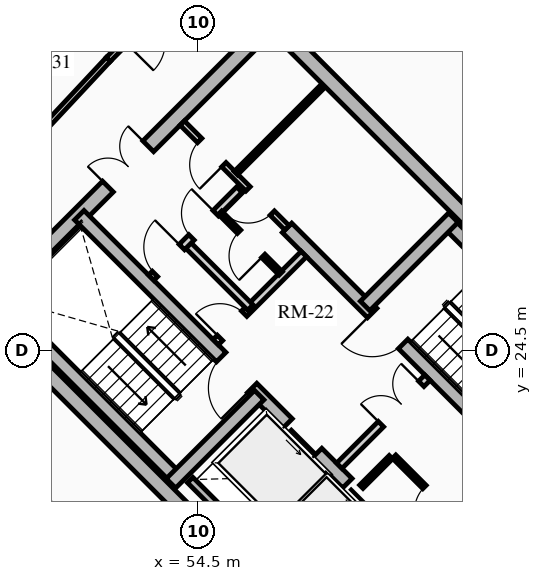
"""IFC4 building model, lengths in metres.
Left out: names, types, materials, properties, quantities, classifications, styles, units other than length and angle.
Written with IfcOpenShell. Run it as: python <this file> out.ifc"""

import sys

from ifc_helpers import new_model, si_unit, direction, frame, frame_2d, origin, place, context, subcontext, project, spatial, rectangle, extrude, source, transform, mapped, element, fill, save


model = new_model("IFC4")
c1 = context("Model", 3, precision=1e-05, world=origin(), true_north=direction((0.0, 1.0)))
c2 = subcontext(c1, "Body", "Model", "MODEL_VIEW")
j1 = project(units=[si_unit("LENGTHUNIT", "METRE"), si_unit("PLANEANGLEUNIT", "RADIAN")], contexts=[c1])
p1 = place(None, origin())
s1 = spatial("IfcSite", under=j1, at=p1, CompositionType="ELEMENT")
p2 = place(p1, origin())
s2 = spatial("IfcBuilding", under=s1, at=p2, CompositionType="ELEMENT")
p3 = place(p2, frame((0.0, 0.0, 163.24)))
s3 = spatial("IfcBuildingStorey", under=s2, at=p3, CompositionType="ELEMENT", Elevation=163.24)
for number, where, z_axis, x_axis in (
    (1, (58.702, 15.732, 0.0), (0.0, 0.0, 1.0), (-0.707, 0.707, 0.0)),
    (2, (66.268, 23.298, 0.0), (0.0, 0.0, 1.0), (-0.707, 0.707, 0.0)),
):
    element("IfcWall", number, at=place(p3, frame(where, z_axis=z_axis, x_axis=x_axis)), inside=s3, PredefinedType="SHEAR", context=c2, shape_type="SweptSolid", body=[
        extrude(rectangle(XDim=14.1, YDim=0.4, at=frame_2d((7.05, 0.0))), origin(), (0.0, 0.0, 1.0), 2.91),
    ])
p4 = place(p3, frame((58.561, 15.873, 0.0), z_axis=(0.0, 0.0, 1.0), x_axis=(0.707106781187, 0.707106781187, 0.0)))
e3 = element("IfcWall", 3, at=p4, inside=s3, PredefinedType="SHEAR", context=c2, shape_type="SweptSolid", body=[
    extrude(rectangle(XDim=10.7, YDim=0.4, at=frame_2d((5.35, 0.0))), origin(), (0.0, 0.0, 1.0), 2.91),
])
m1 = source(origin(), c2, "Body", "SweptSolid", [
    extrude(rectangle(XDim=1.5, YDim=2.02, at=frame_2d((0.75, 1.01))), frame((0.0, 0.21, 0.0), z_axis=(0.0, -1.0, 0.0), x_axis=(1.0, 0.0, 0.0)), (0.0, 0.0, 1.0), 0.42),
])
p5 = place(p4, frame((5.45, 0.0, 0.0)))
e4 = element("IfcOpeningElement", 4, at=p5, cuts=e3, PredefinedType="OPENING", context=c2, shape_type="MappedRepresentation", body=[
    mapped(m1, transform((0.0, 0.0, 0.0), x_axis=(1.0, 0.0, 0.0), y_axis=(0.0, 1.0, 0.0), z_axis=(0.0, 0.0, 1.0), scale=1.0)),
])
p6 = place(p3, frame((48.873, 25.561, 0.0), z_axis=(0.0, 0.0, 1.0), x_axis=(0.707106781187, 0.707106781187, 0.0)))
e5 = element("IfcWall", 5, at=p6, inside=s3, PredefinedType="SHEAR", context=c2, shape_type="SweptSolid", body=[
    extrude(rectangle(XDim=10.7, YDim=0.4, at=frame_2d((5.35, 0.0))), origin(), (0.0, 0.0, 1.0), 2.91),
])
p7 = place(p6, frame((4.6, 0.0, 0.0)))
e6 = element("IfcOpeningElement", 6, at=p7, cuts=e5, PredefinedType="OPENING", context=c2, shape_type="MappedRepresentation", body=[
    mapped(m1, transform((0.0, 0.0, 0.0), x_axis=(1.0, 0.0, 0.0), y_axis=(0.0, 1.0, 0.0), z_axis=(0.0, 0.0, 1.0), scale=1.0)),
])
p8 = place(p3, frame((61.06, 18.373, 0.0), z_axis=(0.0, 0.0, 1.0), x_axis=(-0.707106781187, 0.707106781187, 0.0)))
e7 = element("IfcWall", 7, at=p8, inside=s3, PredefinedType="SHEAR", context=c2, shape_type="SweptSolid", body=[
    extrude(rectangle(XDim=13.7, YDim=0.35, at=frame_2d((6.85, 0.0))), origin(), (0.0, 0.0, 1.0), 2.91),
])
m2 = source(origin(), c2, "Body", "SweptSolid", [
    extrude(rectangle(XDim=1.1, YDim=2.015, at=frame_2d((0.55, 1.007))), frame((0.0, 0.185, 0.0), z_axis=(0.0, -1.0, 0.0), x_axis=(1.0, 0.0, 0.0)), (0.0, 0.0, 1.0), 0.37),
])
p9 = place(p8, frame((4.85, 0.0, 0.0)))
e8 = element("IfcOpeningElement", 8, at=p9, cuts=e7, PredefinedType="OPENING", context=c2, shape_type="MappedRepresentation", body=[
    mapped(m2, transform((0.0, 0.0, 0.0), x_axis=(1.0, 0.0, 0.0), y_axis=(0.0, 1.0, 0.0), z_axis=(0.0, 0.0, 1.0), scale=1.0)),
])
p10 = place(p8, frame((0.625, 0.0, 0.0)))
e9 = element("IfcOpeningElement", 9, at=p10, cuts=e7, PredefinedType="OPENING", context=c2, shape_type="MappedRepresentation", body=[
    mapped(m2, transform((0.0, 0.0, 0.0), x_axis=(1.0, 0.0, 0.0), y_axis=(0.0, 1.0, 0.0), z_axis=(0.0, 0.0, 1.0), scale=1.0)),
])
p11 = place(p8, frame((2.625, 0.0, 0.0)))
e10 = element("IfcOpeningElement", 10, at=p11, cuts=e7, PredefinedType="OPENING", context=c2, shape_type="MappedRepresentation", body=[
    mapped(m2, transform((0.0, 0.0, 0.0), x_axis=(1.0, 0.0, 0.0), y_axis=(0.0, 1.0, 0.0), z_axis=(0.0, 0.0, 1.0), scale=1.0)),
])
m3 = source(origin(), c2, "Body", "SweptSolid", [
    extrude(rectangle(XDim=1.15, YDim=2.02, at=frame_2d((0.575, 1.01))), frame((0.0, 0.185, 0.0), z_axis=(0.0, -1.0, 0.0), x_axis=(1.0, 0.0, 0.0)), (0.0, 0.0, 1.0), 0.37),
])
p12 = place(p8, frame((7.27, 0.0, 0.0)))
e11 = element("IfcOpeningElement", 11, at=p12, cuts=e7, PredefinedType="OPENING", context=c2, shape_type="MappedRepresentation", body=[
    mapped(m3, transform((0.0, 0.0, 0.0), x_axis=(1.0, 0.0, 0.0), y_axis=(0.0, 1.0, 0.0), z_axis=(0.0, 0.0, 1.0), scale=1.0)),
])
p13 = place(p3, frame((63.627, 20.94, 0.0), z_axis=(0.0, 0.0, 1.0), x_axis=(-0.707119496762, 0.707094065383, 0.0)))
e12 = element("IfcWall", 12, at=p13, inside=s3, PredefinedType="SHEAR", context=c2, shape_type="SweptSolid", body=[
    extrude(rectangle(XDim=9.6, YDim=0.35, at=frame_2d((4.8, 0.0))), origin(), (0.0, 0.0, 1.0), 2.91),
])
p14 = place(p13, frame((5.28, 0.0, 0.0)))
e13 = element("IfcOpeningElement", 13, at=p14, cuts=e12, PredefinedType="OPENING", context=c2, shape_type="MappedRepresentation", body=[
    mapped(m3, transform((0.0, 0.0, 0.0), x_axis=(1.0, 0.0, 0.0), y_axis=(0.0, 1.0, 0.0), z_axis=(0.0, 0.0, 1.0), scale=1.0)),
])
p15 = place(p3, frame((53.922, 21.141, 0.0), z_axis=(0.0, 0.0, 1.0), x_axis=(-0.707106781187, 0.707106781187, 0.0)))
e14 = element("IfcWall", 14, at=p15, inside=s3, PredefinedType="SHEAR", context=c2, shape_type="SweptSolid", body=[
    extrude(rectangle(XDim=6.695, YDim=0.35, at=frame_2d((3.348, 0.0))), origin(), (0.0, 0.0, 1.0), 2.91),
])
p16 = place(p3, frame((53.784, 21.003, 0.0), z_axis=(0.0, 0.0, 1.0), x_axis=(0.707106781187, 0.707106781187, 0.0)))
e15 = element("IfcWall", 15, at=p16, inside=s3, PredefinedType="SHEAR", context=c2, shape_type="SweptSolid", body=[
    extrude(rectangle(XDim=3.285, YDim=0.35, at=frame_2d((1.643, 0.0))), origin(), (0.0, 0.0, 1.0), 2.91),
])
p17 = place(p3, frame((65.812, 23.125, 0.0), z_axis=(0.0, 0.0, 1.0), x_axis=(-0.707106781187, 0.707106781187, 0.0)))
e16 = element("IfcWall", 16, at=p17, inside=s3, PredefinedType="SHEAR", context=c2, shape_type="SweptSolid", body=[
    extrude(rectangle(XDim=6.695, YDim=0.35, at=frame_2d((3.348, 0.0))), origin(), (0.0, 0.0, 1.0), 2.91),
])
p18 = place(p3, frame((58.893, 25.674, 0.0), z_axis=(0.0, 0.0, 1.0), x_axis=(0.707106781187, 0.707106781187, 0.0)))
e17 = element("IfcWall", 17, at=p18, inside=s3, PredefinedType="SHEAR", context=c2, shape_type="SweptSolid", body=[
    extrude(rectangle(XDim=3.285, YDim=0.35, at=frame_2d((1.643, 0.0))), origin(), (0.0, 0.0, 1.0), 2.91),
])
p19 = place(p3, frame((55.888, 19.069, 0.0), z_axis=(0.0, 0.0, 1.0), x_axis=(0.707106781187, 0.707106781187, 0.0)))
e18 = element("IfcWall", 18, at=p19, inside=s3, PredefinedType="SHEAR", context=c2, shape_type="SweptSolid", body=[
    extrude(rectangle(XDim=2.97, YDim=0.2, at=frame_2d((1.485, 0.0))), origin(), (0.0, 0.0, 1.0), 2.91),
])
p20 = place(p3, frame((56.015, 19.366, 0.0), z_axis=(0.0, 0.0, 1.0), x_axis=(-0.707106781187, 0.707106781187, 0.0)))
e19 = element("IfcWall", 19, at=p20, inside=s3, PredefinedType="SHEAR", context=c2, shape_type="SweptSolid", body=[
    extrude(rectangle(XDim=2.44, YDim=0.2, at=frame_2d((1.22, 0.0))), origin(), (0.0, 0.0, 1.0), 2.91),
])
p21 = place(p3, frame((58.214, 21.467, 0.0), z_axis=(0.0, 0.0, 1.0), x_axis=(0.707106781187, 0.707106781187, 0.0)))
e20 = element("IfcWall", 20, at=p21, inside=s3, PredefinedType="PARTITIONING", context=c2, shape_type="SweptSolid", body=[
    extrude(rectangle(XDim=3.28, YDim=0.2, at=frame_2d((1.64, 0.0))), origin(), (0.0, 0.0, 1.0), 2.675),
])
m4 = source(origin(), c2, "Body", "SweptSolid", [
    extrude(rectangle(XDim=1.5, YDim=2.02, at=frame_2d((0.75, 1.01))), frame((0.0, 0.11, 0.0), z_axis=(0.0, -1.0, 0.0), x_axis=(1.0, 0.0, 0.0)), (0.0, 0.0, 1.0), 0.22),
])
p22 = place(p21, frame((1.55, 0.0, 0.0)))
e21 = element("IfcOpeningElement", 21, at=p22, cuts=e20, PredefinedType="OPENING", context=c2, shape_type="MappedRepresentation", body=[
    mapped(m4, transform((0.0, 0.0, 0.0), x_axis=(1.0, 0.0, 0.0), y_axis=(0.0, 1.0, 0.0), z_axis=(0.0, 0.0, 1.0), scale=1.0)),
])
p23 = place(p3, frame((54.961, 24.719, 0.0), z_axis=(0.0, 0.0, 1.0), x_axis=(0.707106781187, 0.707106781187, 0.0)))
e22 = element("IfcWall", 22, at=p23, inside=s3, PredefinedType="PARTITIONING", context=c2, shape_type="SweptSolid", body=[
    extrude(rectangle(XDim=3.28, YDim=0.2, at=frame_2d((1.64, 0.0))), origin(), (0.0, 0.0, 1.0), 2.675),
])
m5 = source(origin(), c2, "Body", "SweptSolid", [
    extrude(rectangle(XDim=0.9, YDim=2.005, at=frame_2d((0.45, 1.002))), frame((0.0, 0.11, 0.0), z_axis=(0.0, -1.0, 0.0), x_axis=(1.0, 0.0, 0.0)), (0.0, 0.0, 1.0), 0.22),
])
p24 = place(p23, frame((0.16, 0.0, 0.0)))
e23 = element("IfcOpeningElement", 23, at=p24, cuts=e22, PredefinedType="OPENING", context=c2, shape_type="MappedRepresentation", body=[
    mapped(m5, transform((0.0, 0.0, 0.0), x_axis=(1.0, 0.0, 0.0), y_axis=(0.0, 1.0, 0.0), z_axis=(0.0, 0.0, 1.0), scale=1.0)),
])
p25 = place(p3, frame((55.874, 25.631, 0.0), z_axis=(0.0, 0.0, 1.0), x_axis=(-0.707157639372, 0.707055919343, 0.0)))
e24 = element("IfcWall", 24, at=p25, inside=s3, PredefinedType="PARTITIONING", context=c2, shape_type="SweptSolid", body=[
    extrude(rectangle(XDim=2.4, YDim=0.2, at=frame_2d((1.2, 0.0))), origin(), (0.0, 0.0, 1.0), 2.675),
])
p26 = place(p3, frame((53.264, 26.416, 0.0), z_axis=(0.0, 0.0, 1.0), x_axis=(0.707106781187, 0.707106781187, 0.0)))
e25 = element("IfcWall", 25, at=p26, inside=s3, PredefinedType="PARTITIONING", context=c2, shape_type="SweptSolid", body=[
    extrude(rectangle(XDim=3.28, YDim=0.2, at=frame_2d((1.64, 0.0))), origin(), (0.0, 0.0, 1.0), 2.675),
])
m6 = source(origin(), c2, "Body", "SweptSolid", [
    extrude(rectangle(XDim=1.0, YDim=2.015, at=frame_2d((0.5, 1.007))), frame((0.0, 0.11, 0.0), z_axis=(0.0, -1.0, 0.0), x_axis=(1.0, 0.0, 0.0)), (0.0, 0.0, 1.0), 0.22),
])
p27 = place(p26, frame((0.14, 0.0, 0.0)))
e26 = element("IfcOpeningElement", 26, at=p27, cuts=e25, PredefinedType="OPENING", context=c2, shape_type="MappedRepresentation", body=[
    mapped(m6, transform((0.0, 0.0, 0.0), x_axis=(1.0, 0.0, 0.0), y_axis=(0.0, 1.0, 0.0), z_axis=(0.0, 0.0, 1.0), scale=1.0)),
])
p28 = place(p26, frame((1.5, 0.0, 0.0)))
e27 = element("IfcOpeningElement", 27, at=p28, cuts=e25, PredefinedType="OPENING", context=c2, shape_type="MappedRepresentation", body=[
    mapped(m5, transform((0.0, 0.0, 0.0), x_axis=(1.0, 0.0, 0.0), y_axis=(0.0, 1.0, 0.0), z_axis=(0.0, 0.0, 1.0), scale=1.0)),
])
p29 = place(p3, frame((61.835, 19.529, 0.0), z_axis=(0.0, 0.0, 1.0), x_axis=(-0.707146413884, 0.707067146267, 0.0)))
e28 = element("IfcWall", 28, at=p29, inside=s3, PredefinedType="PARTITIONING", context=c2, shape_type="SweptSolid", body=[
    extrude(rectangle(XDim=3.08, YDim=0.125, at=frame_2d((1.54, 0.0))), origin(), (0.0, 0.0, 1.0), 2.675),
])
m7 = source(origin(), c2, "Body", "SweptSolid", [
    extrude(rectangle(XDim=0.9, YDim=2.005, at=frame_2d((0.45, 1.002))), frame((0.0, 0.073, 0.0), z_axis=(0.0, -1.0, 0.0), x_axis=(1.0, 0.0, 0.0)), (0.0, 0.0, 1.0), 0.145),
])
p30 = place(p29, frame((1.05, 0.0, 0.0)))
e29 = element("IfcOpeningElement", 29, at=p30, cuts=e28, PredefinedType="OPENING", context=c2, shape_type="MappedRepresentation", body=[
    mapped(m7, transform((0.0, 0.0, 0.0), x_axis=(1.0, 0.0, 0.0), y_axis=(0.0, 1.0, 0.0), z_axis=(0.0, 0.0, 1.0), scale=1.0)),
])
p31 = place(p3, frame((58.794, 20.915, 0.0), z_axis=(0.0, 0.0, 1.0), x_axis=(0.707106781187, 0.707106781187, 0.0)))
e30 = element("IfcWall", 30, at=p31, inside=s3, PredefinedType="PARTITIONING", context=c2, shape_type="SweptSolid", body=[
    extrude(rectangle(XDim=1.1, YDim=0.125, at=frame_2d((0.55, 0.0))), origin(), (0.0, 0.0, 1.0), 2.675),
])
p32 = place(p3, frame((56.673, 26.529, 0.0), z_axis=(0.0, 0.0, 1.0), x_axis=(-0.707052764397, 0.70716079385, 0.0)))
e31 = element("IfcWall", 31, at=p32, inside=s3, PredefinedType="PARTITIONING", context=c2, shape_type="SweptSolid", body=[
    extrude(rectangle(XDim=2.26, YDim=0.125, at=frame_2d((1.13, 0.0))), origin(), (0.0, 0.0, 1.0), 2.675),
])
p33 = place(p32, frame((0.65, 0.0, 0.0)))
e32 = element("IfcOpeningElement", 32, at=p33, cuts=e31, PredefinedType="OPENING", context=c2, shape_type="MappedRepresentation", body=[
    mapped(m7, transform((0.0, 0.0, 0.0), x_axis=(1.0, 0.0, 0.0), y_axis=(0.0, 1.0, 0.0), z_axis=(0.0, 0.0, 1.0), scale=1.0)),
])
p34 = place(p3, frame((56.839, 27.728, 0.0), z_axis=(0.0, 0.0, 1.0), x_axis=(-0.707106781187, 0.707106781187, 0.0)))
e33 = element("IfcWall", 33, at=p34, inside=s3, PredefinedType="PARTITIONING", context=c2, shape_type="SweptSolid", body=[
    extrude(rectangle(XDim=3.9, YDim=0.16, at=frame_2d((1.95, 0.0))), origin(), (0.0, 0.0, 1.0), 2.675),
])
m8 = source(origin(), c2, "Body", "SweptSolid", [
    extrude(rectangle(XDim=0.9, YDim=2.005, at=frame_2d((0.45, 1.002))), frame((0.0, 0.09, 0.0), z_axis=(0.0, -1.0, 0.0), x_axis=(1.0, 0.0, 0.0)), (0.0, 0.0, 1.0), 0.18),
])
p35 = place(p34, frame((0.55, 0.0, 0.0)))
e34 = element("IfcOpeningElement", 34, at=p35, cuts=e33, PredefinedType="OPENING", context=c2, shape_type="MappedRepresentation", body=[
    mapped(m8, transform((0.0, 0.0, 0.0), x_axis=(1.0, 0.0, 0.0), y_axis=(0.0, 1.0, 0.0), z_axis=(0.0, 0.0, 1.0), scale=1.0)),
])
p36 = place(p34, frame((2.35, 0.0, 0.0)))
e35 = element("IfcOpeningElement", 35, at=p36, cuts=e33, PredefinedType="OPENING", context=c2, shape_type="MappedRepresentation", body=[
    mapped(m8, transform((0.0, 0.0, 0.0), x_axis=(1.0, 0.0, 0.0), y_axis=(0.0, 1.0, 0.0), z_axis=(0.0, 0.0, 1.0), scale=1.0)),
])
p37 = place(p3, frame((55.492, 29.167, 0.0), z_axis=(0.0, 0.0, 1.0), x_axis=(0.707144688645, 0.707068871696, 0.0)))
e36 = element("IfcWall", 36, at=p37, inside=s3, PredefinedType="PARTITIONING", context=c2, shape_type="SweptSolid", body=[
    extrude(rectangle(XDim=3.22, YDim=0.125, at=frame_2d((1.61, 0.0))), origin(), (0.0, 0.0, 1.0), 2.212),
])
p38 = place(p3, frame((54.488, 34.535, 0.0), z_axis=(0.0, 0.0, 1.0), x_axis=(-0.703666289339, -0.710530613871, 0.0)))
e37 = element("IfcWall", 37, at=p38, inside=s3, PredefinedType="PARTITIONING", context=c2, shape_type="SweptSolid", body=[
    extrude(rectangle(XDim=3.343, YDim=0.15, at=frame_2d((1.672, 0.0))), origin(), (0.0, 0.0, 1.0), 2.245),
])
m9 = source(origin(), c2, "Body", "SweptSolid", [
    extrude(rectangle(XDim=1.05, YDim=2.015, at=frame_2d((0.525, 1.007))), frame((0.0, 0.085, 0.0), z_axis=(0.0, -1.0, 0.0), x_axis=(1.0, 0.0, 0.0)), (0.0, 0.0, 1.0), 0.17),
])
p39 = place(p38, frame((1.66, 0.0, 0.0)))
e38 = element("IfcOpeningElement", 38, at=p39, cuts=e37, PredefinedType="OPENING", context=c2, shape_type="MappedRepresentation", body=[
    mapped(m9, transform((0.0, 0.0, 0.0), x_axis=(1.0, 0.0, 0.0), y_axis=(0.0, 1.0, 0.0), z_axis=(0.0, 0.0, 1.0), scale=1.0)),
])
p40 = place(p3, frame((52.135, 32.159, 0.0), z_axis=(0.0, 0.0, 1.0), x_axis=(-0.682546302454, -0.730842353047, 0.0)))
e39 = element("IfcWall", 39, at=p40, inside=s3, PredefinedType="PARTITIONING", context=c2, shape_type="SweptSolid", body=[
    extrude(rectangle(XDim=6.445, YDim=0.15, at=frame_2d((3.223, 0.0))), origin(), (0.0, 0.0, 1.0), 2.245),
])
p41 = place(p3, frame((47.844, 23.253, 0.0), z_axis=(0.0, 0.0, 1.0), x_axis=(0.696248411352, -0.717800912293, 0.0)))
e40 = element("IfcWall", 40, at=p41, inside=s3, PredefinedType="PARTITIONING", context=c2, shape_type="SweptSolid", body=[
    extrude(rectangle(XDim=5.947, YDim=0.15, at=frame_2d((2.974, 0.0))), origin(), (0.0, 0.0, 1.0), 2.675),
])
p42 = place(p3, frame((46.732, 21.959, 0.0), z_axis=(0.0, 0.0, 1.0), x_axis=(0.674328014222, -0.738431939474, 0.0)))
e41 = element("IfcWall", 41, at=p42, inside=s3, PredefinedType="PARTITIONING", context=c2, shape_type="SweptSolid", body=[
    extrude(rectangle(XDim=5.823, YDim=0.125, at=frame_2d((2.912, 0.0))), origin(), (0.0, 0.0, 1.0), 2.675),
])
p43 = place(p42, frame((2.462, 0.0, 0.0)))
e42 = element("IfcOpeningElement", 42, at=p43, cuts=e41, PredefinedType="OPENING", context=c2, shape_type="MappedRepresentation", body=[
    mapped(m7, transform((0.0, 0.0, 0.0), x_axis=(1.0, 0.0, 0.0), y_axis=(0.0, 1.0, 0.0), z_axis=(0.0, 0.0, 1.0), scale=1.0)),
])
m10 = source(origin(), c2, "Body", "SweptSolid", [
    extrude(rectangle(XDim=1.1, YDim=2.015, at=frame_2d((0.55, 1.007))), frame((0.0, 0.025, 0.0), z_axis=(0.0, -1.0, 0.0), x_axis=(1.0, 0.0, 0.0)), (0.0, 0.0, 1.0), 0.05),
])
p44 = place(p9, origin())
e43 = element("IfcDoor", 43, at=p44, inside=s3, OperationType="SLIDING_TO_LEFT", PredefinedType="DOOR", context=c2, shape_type="MappedRepresentation", body=[
    mapped(m10, transform((0.0, 0.0, 0.0), x_axis=(1.0, 0.0, 0.0), y_axis=(0.0, 1.0, 0.0), z_axis=(0.0, 0.0, 1.0), scale=1.0)),
])
fill(e8, e43)
p45 = place(p11, origin())
e44 = element("IfcDoor", 44, at=p45, inside=s3, OperationType="SLIDING_TO_LEFT", PredefinedType="DOOR", context=c2, shape_type="MappedRepresentation", body=[
    mapped(m10, transform((0.0, 0.0, 0.0), x_axis=(1.0, 0.0, 0.0), y_axis=(0.0, 1.0, 0.0), z_axis=(0.0, 0.0, 1.0), scale=1.0)),
])
fill(e10, e44)
m11 = source(origin(), c2, "Body", "SweptSolid", [
    extrude(rectangle(XDim=1.15, YDim=2.02, at=frame_2d((0.575, 1.01))), frame((0.0, 0.025, 0.0), z_axis=(0.0, -1.0, 0.0), x_axis=(1.0, 0.0, 0.0)), (0.0, 0.0, 1.0), 0.05),
])
p46 = place(p12, origin())
e45 = element("IfcDoor", 45, at=p46, inside=s3, OperationType="SINGLE_SWING_LEFT", PredefinedType="DOOR", context=c2, shape_type="MappedRepresentation", body=[
    mapped(m11, transform((0.0, 0.0, 0.0), x_axis=(1.0, 0.0, 0.0), y_axis=(0.0, 1.0, 0.0), z_axis=(0.0, 0.0, 1.0), scale=1.0)),
])
fill(e11, e45)
p47 = place(p14, origin())
e46 = element("IfcDoor", 46, at=p47, inside=s3, OperationType="SINGLE_SWING_RIGHT", PredefinedType="DOOR", context=c2, shape_type="MappedRepresentation", body=[
    mapped(m11, transform((0.0, 0.0, 0.0), x_axis=(1.0, 0.0, 0.0), y_axis=(0.0, 1.0, 0.0), z_axis=(0.0, 0.0, 1.0), scale=1.0)),
])
fill(e13, e46)
m12 = source(origin(), c2, "Body", "SweptSolid", [
    extrude(rectangle(XDim=1.5, YDim=2.02, at=frame_2d((0.75, 1.01))), frame((0.0, 0.025, 0.0), z_axis=(0.0, -1.0, 0.0), x_axis=(1.0, 0.0, 0.0)), (0.0, 0.0, 1.0), 0.05),
])
p48 = place(p7, origin())
e47 = element("IfcDoor", 47, at=p48, inside=s3, OperationType="DOUBLE_DOOR_SINGLE_SWING", PredefinedType="DOOR", context=c2, shape_type="MappedRepresentation", body=[
    mapped(m12, transform((0.0, 0.0, 0.0), x_axis=(1.0, 0.0, 0.0), y_axis=(0.0, 1.0, 0.0), z_axis=(0.0, 0.0, 1.0), scale=1.0)),
])
fill(e6, e47)
p49 = place(p22, origin())
e48 = element("IfcDoor", 48, at=p49, inside=s3, OperationType="DOUBLE_DOOR_SINGLE_SWING", PredefinedType="DOOR", context=c2, shape_type="MappedRepresentation", body=[
    mapped(m12, transform((0.0, 0.0, 0.0), x_axis=(1.0, 0.0, 0.0), y_axis=(0.0, 1.0, 0.0), z_axis=(0.0, 0.0, 1.0), scale=1.0)),
])
fill(e21, e48)
m13 = source(origin(), c2, "Body", "SweptSolid", [
    extrude(rectangle(XDim=0.9, YDim=2.005, at=frame_2d((0.45, 1.002))), frame((0.0, 0.025, 0.0), z_axis=(0.0, -1.0, 0.0), x_axis=(1.0, 0.0, 0.0)), (0.0, 0.0, 1.0), 0.05),
])
p50 = place(p24, origin())
e49 = element("IfcDoor", 49, at=p50, inside=s3, OperationType="SINGLE_SWING_LEFT", PredefinedType="DOOR", context=c2, shape_type="MappedRepresentation", body=[
    mapped(m13, transform((0.0, 0.0, 0.0), x_axis=(1.0, 0.0, 0.0), y_axis=(0.0, 1.0, 0.0), z_axis=(0.0, 0.0, 1.0), scale=1.0)),
])
fill(e23, e49)
m14 = source(origin(), c2, "Body", "SweptSolid", [
    extrude(rectangle(XDim=1.0, YDim=2.015, at=frame_2d((0.5, 1.007))), frame((0.0, 0.025, 0.0), z_axis=(0.0, -1.0, 0.0), x_axis=(1.0, 0.0, 0.0)), (0.0, 0.0, 1.0), 0.05),
])
p51 = place(p27, origin())
e50 = element("IfcDoor", 50, at=p51, inside=s3, OperationType="SINGLE_SWING_RIGHT", PredefinedType="DOOR", context=c2, shape_type="MappedRepresentation", body=[
    mapped(m14, transform((0.0, 0.0, 0.0), x_axis=(1.0, 0.0, 0.0), y_axis=(0.0, 1.0, 0.0), z_axis=(0.0, 0.0, 1.0), scale=1.0)),
])
fill(e26, e50)
p52 = place(p30, origin())
e51 = element("IfcDoor", 51, at=p52, inside=s3, OperationType="SINGLE_SWING_LEFT", PredefinedType="DOOR", context=c2, shape_type="MappedRepresentation", body=[
    mapped(m13, transform((0.0, 0.0, 0.0), x_axis=(1.0, 0.0, 0.0), y_axis=(0.0, 1.0, 0.0), z_axis=(0.0, 0.0, 1.0), scale=1.0)),
])
fill(e29, e51)
p53 = place(p28, origin())
e52 = element("IfcDoor", 52, at=p53, inside=s3, OperationType="SINGLE_SWING_RIGHT", PredefinedType="DOOR", context=c2, shape_type="MappedRepresentation", body=[
    mapped(m13, transform((0.0, 0.0, 0.0), x_axis=(1.0, 0.0, 0.0), y_axis=(0.0, 1.0, 0.0), z_axis=(0.0, 0.0, 1.0), scale=1.0)),
])
fill(e27, e52)
p54 = place(p33, origin())
e53 = element("IfcDoor", 53, at=p54, inside=s3, OperationType="SINGLE_SWING_LEFT", PredefinedType="DOOR", context=c2, shape_type="MappedRepresentation", body=[
    mapped(m13, transform((0.0, 0.0, 0.0), x_axis=(1.0, 0.0, 0.0), y_axis=(0.0, 1.0, 0.0), z_axis=(0.0, 0.0, 1.0), scale=1.0)),
])
fill(e32, e53)
p55 = place(p35, origin())
e54 = element("IfcDoor", 54, at=p55, inside=s3, OperationType="SINGLE_SWING_RIGHT", PredefinedType="DOOR", context=c2, shape_type="MappedRepresentation", body=[
    mapped(m13, transform((0.0, 0.0, 0.0), x_axis=(1.0, 0.0, 0.0), y_axis=(0.0, 1.0, 0.0), z_axis=(0.0, 0.0, 1.0), scale=1.0)),
])
fill(e34, e54)
p56 = place(p36, origin())
e55 = element("IfcDoor", 55, at=p56, inside=s3, OperationType="SINGLE_SWING_LEFT", PredefinedType="DOOR", context=c2, shape_type="MappedRepresentation", body=[
    mapped(m13, transform((0.0, 0.0, 0.0), x_axis=(1.0, 0.0, 0.0), y_axis=(0.0, 1.0, 0.0), z_axis=(0.0, 0.0, 1.0), scale=1.0)),
])
fill(e35, e55)
save(model, sys.argv[1])
